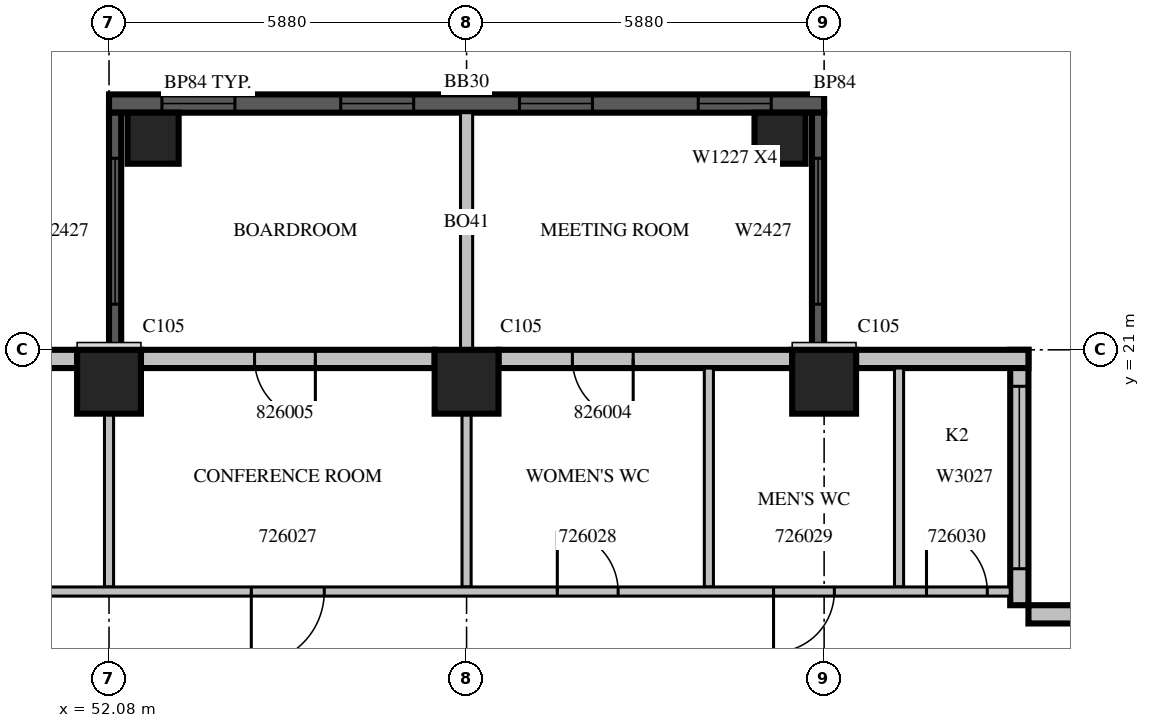
"""IFC4 building model, lengths in metres.
Left out: names, types, materials, properties, quantities, classifications, styles, units other than length and angle.
Written with IfcOpenShell. Run it as: python <this file> out.ifc"""

import sys

from ifc_helpers import new_model, si_unit, direction, frame, frame_2d, origin, origin_2d, place, context, subcontext, project, spatial, rectangle, extrude, source, transform, mapped, element, fill, save


model = new_model("IFC4")
c1 = context("Model", 3, precision=1e-05, world=origin(), true_north=direction((0.0, 1.0)))
c2 = subcontext(c1, "Body", "Model", "MODEL_VIEW")
j1 = project(units=[si_unit("LENGTHUNIT", "METRE"), si_unit("PLANEANGLEUNIT", "RADIAN")], contexts=[c1])
p1 = place(None, origin())
s1 = spatial("IfcSite", under=j1, at=p1, CompositionType="ELEMENT")
p2 = place(p1, origin())
s2 = spatial("IfcBuilding", under=s1, at=p2, CompositionType="ELEMENT")
p3 = place(p2, frame((0.0, 0.0, 120.3)))
s3 = spatial("IfcBuildingStorey", under=s2, at=p3, CompositionType="ELEMENT", Elevation=120.3)
m1 = source(origin(), c2, "Body", "SweptSolid", [
    extrude(rectangle(XDim=1.05, YDim=1.05, at=origin_2d()), origin(), (0.0, 0.0, 1.0), 4.2),
])
for number, where, z_axis, x_axis in (
    (1, (52.08, 20.475, 0.0), (0.0, 0.0, 1.0), (1.0, 0.0, 0.0)),
    (2, (57.96, 20.475, 0.0), (0.0, 0.0, 1.0), (1.0, 0.0, 0.0)),
    (3, (63.84, 20.475, 0.0), (0.0, 0.0, 1.0), (1.0, 0.0, 0.0)),
):
    element("IfcColumn", number, at=place(p3, frame(where, z_axis=z_axis, x_axis=x_axis)), inside=s3, PredefinedType="COLUMN", context=c2, shape_type="MappedRepresentation", body=[
        mapped(m1, transform((0.0, 0.0, 0.0), scale=1.0)),
    ])
m2 = source(origin(), c2, "Body", "SweptSolid", [
    extrude(rectangle(XDim=0.84, YDim=0.84, at=origin_2d()), origin(), (0.0, 0.0, 1.0), 4.2),
])
for number, where, z_axis, x_axis in (
    (4, (52.805, 24.48, 0.0), (0.0, 0.0, 1.0), (1.0, 0.0, 0.0)),
    (5, (63.115, 24.48, 0.0), (0.0, 0.0, 1.0), (1.0, 0.0, 0.0)),
):
    element("IfcColumn", number, at=place(p3, frame(where, z_axis=z_axis, x_axis=x_axis)), inside=s3, PredefinedType="COLUMN", context=c2, shape_type="MappedRepresentation", body=[
        mapped(m2, transform((0.0, 0.0, 0.0), scale=1.0)),
    ])
m3 = source(origin(), c2, "Body", "SweptSolid", [
    extrude(rectangle(XDim=11.76, YDim=0.3, at=frame_2d((5.88, 0.0))), origin(), (0.0, 0.0, 1.0), 3.79),
])
p4 = place(p3, frame((63.84, 25.05, 0.0), z_axis=(0.0, 0.0, 1.0), x_axis=(-1.0, 0.0, 0.0)))
e6 = element("IfcWall", 6, at=p4, inside=s3, PredefinedType="SOLIDWALL", context=c2, shape_type="MappedRepresentation", body=[
    mapped(m3, transform((0.0, 0.0, 0.0), scale=1.0)),
])
m4 = source(origin(), c2, "Body", "SweptSolid", [
    extrude(rectangle(XDim=1.2, YDim=2.7, at=frame_2d((0.6, 1.35))), frame((0.0, 0.16, 0.0), z_axis=(0.0, -1.0, 0.0), x_axis=(1.0, 0.0, 0.0)), (0.0, 0.0, 1.0), 0.32),
])
p5 = place(p4, frame((0.87, 0.0, 0.6)))
e7 = element("IfcOpeningElement", 7, at=p5, cuts=e6, PredefinedType="OPENING", context=c2, shape_type="MappedRepresentation", body=[
    mapped(m4, transform((0.0, 0.0, 0.0), scale=1.0)),
])
p6 = place(p4, frame((3.81, 0.0, 0.6)))
e8 = element("IfcOpeningElement", 8, at=p6, cuts=e6, PredefinedType="OPENING", context=c2, shape_type="MappedRepresentation", body=[
    mapped(m4, transform((0.0, 0.0, 0.0), scale=1.0)),
])
p7 = place(p4, frame((6.75, 0.0, 0.6)))
e9 = element("IfcOpeningElement", 9, at=p7, cuts=e6, PredefinedType="OPENING", context=c2, shape_type="MappedRepresentation", body=[
    mapped(m4, transform((0.0, 0.0, 0.0), scale=1.0)),
])
p8 = place(p4, frame((9.69, 0.0, 0.6)))
e10 = element("IfcOpeningElement", 10, at=p8, cuts=e6, PredefinedType="OPENING", context=c2, shape_type="MappedRepresentation", body=[
    mapped(m4, transform((0.0, 0.0, 0.0), scale=1.0)),
])
m5 = source(origin(), c2, "Body", "SweptSolid", [
    extrude(rectangle(XDim=3.9, YDim=0.2, at=frame_2d((1.95, 0.0))), origin(), (0.0, 0.0, 1.0), 3.79),
])
p9 = place(p3, frame((57.96, 21.0, 0.0), z_axis=(0.0, 0.0, 1.0), x_axis=(0.0, 1.0, 0.0)))
e11 = element("IfcWall", 11, at=p9, inside=s3, PredefinedType="SOLIDWALL", context=c2, shape_type="MappedRepresentation", body=[
    mapped(m5, transform((0.0, 0.0, 0.0), scale=1.0)),
])
m6 = source(origin(), c2, "Body", "SweptSolid", [
    extrude(rectangle(XDim=3.9, YDim=0.2, at=frame_2d((1.95, 0.0))), origin(), (0.0, 0.0, 1.0), 3.79),
])
p10 = place(p3, frame((63.74, 21.0, 0.0), z_axis=(0.0, 0.0, 1.0), x_axis=(0.0, 1.0, 0.0)))
e12 = element("IfcWall", 12, at=p10, inside=s3, PredefinedType="SOLIDWALL", context=c2, shape_type="MappedRepresentation", body=[
    mapped(m6, transform((0.0, 0.0, 0.0), scale=1.0)),
])
m7 = source(origin(), c2, "Body", "SweptSolid", [
    extrude(rectangle(XDim=2.4, YDim=2.7, at=frame_2d((1.2, 1.35))), frame((0.0, 0.11, 0.0), z_axis=(0.0, -1.0, 0.0), x_axis=(1.0, 0.0, 0.0)), (0.0, 0.0, 1.0), 0.22),
])
p11 = place(p10, frame((0.75, 0.0, 0.6)))
e13 = element("IfcOpeningElement", 13, at=p11, cuts=e12, PredefinedType="OPENING", context=c2, shape_type="MappedRepresentation", body=[
    mapped(m7, transform((0.0, 0.0, 0.0), scale=1.0)),
])
p12 = place(p3, frame((52.18, 21.0, 0.0), z_axis=(0.0, 0.0, 1.0), x_axis=(0.0, 1.0, 0.0)))
e14 = element("IfcWall", 14, at=p12, inside=s3, PredefinedType="SOLIDWALL", context=c2, shape_type="MappedRepresentation", body=[
    mapped(m6, transform((0.0, 0.0, 0.0), scale=1.0)),
])
p13 = place(p12, frame((0.75, 0.0, 0.6)))
e15 = element("IfcOpeningElement", 15, at=p13, cuts=e14, PredefinedType="OPENING", context=c2, shape_type="MappedRepresentation", body=[
    mapped(m7, transform((0.0, 0.0, 0.0), scale=1.0)),
])
m8 = source(origin(), c2, "Body", "SweptSolid", [
    extrude(rectangle(XDim=4.2, YDim=0.3, at=frame_2d((2.1, 0.0))), origin(), (0.0, 0.0, 1.0), 3.8),
])
p14 = place(p3, frame((71.4, 16.65, 0.0), z_axis=(0.0, 0.0, 1.0), x_axis=(-1.0, 0.0, 0.0)))
e16 = element("IfcWall", 16, at=p14, inside=s3, PredefinedType="STANDARD", context=c2, shape_type="MappedRepresentation", body=[
    mapped(m8, transform((0.0, 0.0, 0.0), scale=1.0)),
])
p15 = place(p14, frame((0.66, 0.0, 0.6)))
e17 = element("IfcOpeningElement", 17, at=p15, cuts=e16, PredefinedType="OPENING", context=c2, shape_type="MappedRepresentation", body=[
    mapped(m4, transform((0.0, 0.0, 0.0), scale=1.0)),
])
p16 = place(p3, frame((67.05, 16.8, 0.0), z_axis=(0.0, 0.0, 1.0), x_axis=(0.0, 1.0, 0.0)))
e18 = element("IfcWall", 18, at=p16, inside=s3, PredefinedType="STANDARD", context=c2, shape_type="MappedRepresentation", body=[
    mapped(m8, transform((0.0, 0.0, 0.0), scale=1.0)),
])
m9 = source(origin(), c2, "Body", "SweptSolid", [
    extrude(rectangle(XDim=3.0, YDim=2.7, at=frame_2d((1.5, 1.35))), frame((0.0, 0.16, 0.0), z_axis=(0.0, -1.0, 0.0), x_axis=(1.0, 0.0, 0.0)), (0.0, 0.0, 1.0), 0.32),
])
p17 = place(p16, frame((0.6, 0.0, 0.6)))
e19 = element("IfcOpeningElement", 19, at=p17, cuts=e18, PredefinedType="OPENING", context=c2, shape_type="MappedRepresentation", body=[
    mapped(m9, transform((0.0, 0.0, 0.0), scale=1.0)),
])
m10 = source(origin(), c2, "Body", "SweptSolid", [
    extrude(rectangle(XDim=2.835, YDim=0.3, at=frame_2d((1.417, 0.0))), origin(), (0.0, 0.0, 1.0), 3.8),
])
p18 = place(p3, frame((67.2, 20.85, 0.0), z_axis=(0.0, 0.0, 1.0), x_axis=(-1.0, 0.0, 0.0)))
e20 = element("IfcWall", 20, at=p18, inside=s3, PredefinedType="STANDARD", context=c2, shape_type="MappedRepresentation", body=[
    mapped(m10, transform((0.0, 0.0, 0.0), scale=1.0)),
])
m11 = source(origin(), c2, "Body", "SweptSolid", [
    extrude(rectangle(XDim=4.83, YDim=0.3, at=frame_2d((2.415, 0.0))), origin(), (0.0, 0.0, 1.0), 3.8),
])
p19 = place(p3, frame((63.315, 20.85, 0.0), z_axis=(0.0, 0.0, 1.0), x_axis=(-1.0, 0.0, 0.0)))
e21 = element("IfcWall", 21, at=p19, inside=s3, PredefinedType="STANDARD", context=c2, shape_type="MappedRepresentation", body=[
    mapped(m11, transform((0.0, 0.0, 0.0), scale=1.0)),
])
m12 = source(origin(), c2, "Body", "SweptSolid", [
    extrude(rectangle(XDim=1.0, YDim=2.1, at=frame_2d((0.5, 1.05))), frame((0.0, 0.16, 0.0), z_axis=(0.0, -1.0, 0.0), x_axis=(1.0, 0.0, 0.0)), (0.0, 0.0, 1.0), 0.32),
])
p20 = place(p19, frame((2.615, 0.0, 0.0)))
e22 = element("IfcOpeningElement", 22, at=p20, cuts=e21, PredefinedType="OPENING", context=c2, shape_type="MappedRepresentation", body=[
    mapped(m12, transform((0.0, 0.0, 0.0), scale=1.0)),
])
p21 = place(p3, frame((57.435, 20.85, 0.0), z_axis=(0.0, 0.0, 1.0), x_axis=(-1.0, 0.0, 0.0)))
e23 = element("IfcWall", 23, at=p21, inside=s3, PredefinedType="STANDARD", context=c2, shape_type="MappedRepresentation", body=[
    mapped(m11, transform((0.0, 0.0, 0.0), scale=1.0)),
])
p22 = place(p21, frame((1.962, 0.0, 0.0)))
e24 = element("IfcOpeningElement", 24, at=p22, cuts=e23, PredefinedType="OPENING", context=c2, shape_type="MappedRepresentation", body=[
    mapped(m12, transform((0.0, 0.0, 0.0), scale=1.0)),
])
m13 = source(origin(), c2, "Body", "SweptSolid", [
    extrude(rectangle(XDim=1.155, YDim=0.3, at=frame_2d((0.578, 0.0))), origin(), (0.0, 0.0, 1.0), 3.8),
])
p23 = place(p3, frame((51.555, 20.85, 0.0), z_axis=(0.0, 0.0, 1.0), x_axis=(-1.0, 0.0, 0.0)))
e25 = element("IfcWall", 25, at=p23, inside=s3, PredefinedType="STANDARD", context=c2, shape_type="MappedRepresentation", body=[
    mapped(m13, transform((0.0, 0.0, 0.0), scale=1.0)),
])
m14 = source(origin(), c2, "Body", "SweptSolid", [
    extrude(rectangle(XDim=2.851, YDim=0.15, at=frame_2d((1.425, 0.0))), origin(), (0.0, 0.0, 1.0), 3.8),
])
p24 = place(p3, frame((52.08, 19.951, 0.0), z_axis=(0.0, 0.0, 1.0), x_axis=(0.0, -1.0, 0.0)))
e26 = element("IfcWall", 26, at=p24, inside=s3, PredefinedType="PARTITIONING", context=c2, shape_type="MappedRepresentation", body=[
    mapped(m14, transform((0.0, 0.0, 0.0), scale=1.0)),
])
m15 = source(origin(), c2, "Body", "SweptSolid", [
    extrude(rectangle(XDim=3.6, YDim=0.15, at=frame_2d((1.8, 0.0))), origin(), (0.0, 0.0, 1.0), 3.8),
])
for number, where, z_axis, x_axis in (
    (27, (61.944, 20.7, 0.0), (0.0, 0.0, 1.0), (0.0, -1.0, 0.0)),
    (28, (65.072, 20.7, 0.0), (0.0, 0.0, 1.0), (0.0, -1.0, 0.0)),
):
    element("IfcWall", number, at=place(p3, frame(where, z_axis=z_axis, x_axis=x_axis)), inside=s3, PredefinedType="PARTITIONING", context=c2, shape_type="MappedRepresentation", body=[
        mapped(m15, transform((0.0, 0.0, 0.0), scale=1.0)),
    ])
p25 = place(p3, frame((57.96, 17.1, 0.0), z_axis=(0.0, 0.0, 1.0), x_axis=(0.0, 1.0, 0.0)))
e29 = element("IfcWall", 29, at=p25, inside=s3, PredefinedType="PARTITIONING", context=c2, shape_type="MappedRepresentation", body=[
    mapped(m14, transform((0.0, 0.0, 0.0), scale=1.0)),
])
m16 = source(origin(), c2, "Body", "SweptSolid", [
    extrude(rectangle(XDim=37.5, YDim=0.15, at=frame_2d((18.75, 0.0))), origin(), (0.0, 0.0, 1.0), 3.8),
])
p26 = place(p3, frame((29.4, 17.025, 0.0), z_axis=(0.0, 0.0, 1.0), x_axis=(1.0, 0.0, 0.0)))
e30 = element("IfcWall", 30, at=p26, inside=s3, PredefinedType="PARTITIONING", context=c2, shape_type="MappedRepresentation", body=[
    mapped(m16, transform((0.0, 0.0, 0.0), scale=1.0)),
])
m17 = source(origin(), c2, "Body", "SweptSolid", [
    extrude(rectangle(XDim=1.0, YDim=2.1, at=frame_2d((0.5, 1.05))), frame((0.0, 0.085, 0.0), z_axis=(0.0, -1.0, 0.0), x_axis=(1.0, 0.0, 0.0)), (0.0, 0.0, 1.0), 0.17),
])
p27 = place(p26, frame((1.357, 0.0, 0.0)))
e31 = element("IfcOpeningElement", 31, at=p27, cuts=e30, PredefinedType="OPENING", context=c2, shape_type="MappedRepresentation", body=[
    mapped(m17, transform((0.0, 0.0, 0.0), scale=1.0)),
])
p28 = place(p26, frame((4.669, 0.0, 0.0)))
e32 = element("IfcOpeningElement", 32, at=p28, cuts=e30, PredefinedType="OPENING", context=c2, shape_type="MappedRepresentation", body=[
    mapped(m17, transform((0.0, 0.0, 0.0), scale=1.0)),
])
p29 = place(p26, frame((7.012, 0.0, 0.0)))
e33 = element("IfcOpeningElement", 33, at=p29, cuts=e30, PredefinedType="OPENING", context=c2, shape_type="MappedRepresentation", body=[
    mapped(m17, transform((0.0, 0.0, 0.0), scale=1.0)),
])
m18 = source(origin(), c2, "Body", "SweptSolid", [
    extrude(rectangle(XDim=0.9, YDim=2.1, at=frame_2d((0.45, 1.05))), frame((0.0, 0.085, 0.0), z_axis=(0.0, -1.0, 0.0), x_axis=(1.0, 0.0, 0.0)), (0.0, 0.0, 1.0), 0.17),
])
p30 = place(p26, frame((10.05, 0.0, 0.0)))
e34 = element("IfcOpeningElement", 34, at=p30, cuts=e30, PredefinedType="OPENING", context=c2, shape_type="MappedRepresentation", body=[
    mapped(m18, transform((0.0, 0.0, 0.0), scale=1.0)),
])
p31 = place(p26, frame((13.474, 0.0, 0.0)))
e35 = element("IfcOpeningElement", 35, at=p31, cuts=e30, PredefinedType="OPENING", context=c2, shape_type="MappedRepresentation", body=[
    mapped(m17, transform((0.0, 0.0, 0.0), scale=1.0)),
])
p32 = place(p26, frame((15.624, 0.0, 0.0)))
e36 = element("IfcOpeningElement", 36, at=p32, cuts=e30, PredefinedType="OPENING", context=c2, shape_type="MappedRepresentation", body=[
    mapped(m18, transform((0.0, 0.0, 0.0), scale=1.0)),
])
m19 = source(origin(), c2, "Body", "SweptSolid", [
    extrude(rectangle(XDim=1.2, YDim=2.1, at=frame_2d((0.6, 1.05))), frame((0.0, 0.085, 0.0), z_axis=(0.0, -1.0, 0.0), x_axis=(1.0, 0.0, 0.0)), (0.0, 0.0, 1.0), 0.17),
])
p33 = place(p26, frame((19.14, 0.0, 0.0)))
e37 = element("IfcOpeningElement", 37, at=p33, cuts=e30, PredefinedType="OPENING", context=c2, shape_type="MappedRepresentation", body=[
    mapped(m19, transform((0.0, 0.0, 0.0), scale=1.0)),
])
p34 = place(p26, frame((25.02, 0.0, 0.0)))
e38 = element("IfcOpeningElement", 38, at=p34, cuts=e30, PredefinedType="OPENING", context=c2, shape_type="MappedRepresentation", body=[
    mapped(m19, transform((0.0, 0.0, 0.0), scale=1.0)),
])
p35 = place(p26, frame((30.052, 0.0, 0.0)))
e39 = element("IfcOpeningElement", 39, at=p35, cuts=e30, PredefinedType="OPENING", context=c2, shape_type="MappedRepresentation", body=[
    mapped(m17, transform((0.0, 0.0, 0.0), scale=1.0)),
])
p36 = place(p26, frame((33.608, 0.0, 0.0)))
e40 = element("IfcOpeningElement", 40, at=p36, cuts=e30, PredefinedType="OPENING", context=c2, shape_type="MappedRepresentation", body=[
    mapped(m17, transform((0.0, 0.0, 0.0), scale=1.0)),
])
p37 = place(p26, frame((36.124, 0.0, 0.0)))
e41 = element("IfcOpeningElement", 41, at=p37, cuts=e30, PredefinedType="OPENING", context=c2, shape_type="MappedRepresentation", body=[
    mapped(m17, transform((0.0, 0.0, 0.0), scale=1.0)),
])
m20 = source(origin(), c2, "Body", "SweptSolid", [
    extrude(rectangle(XDim=1.2, YDim=2.7, at=frame_2d((0.6, 1.35))), frame((0.0, 0.03, 0.0), z_axis=(0.0, -1.0, 0.0), x_axis=(1.0, 0.0, 0.0)), (0.0, 0.0, 1.0), 0.06),
])
p38 = place(p5, origin())
e42 = element("IfcWindow", 42, at=p38, inside=s3, PartitioningType="SINGLE_PANEL", PredefinedType="WINDOW", context=c2, shape_type="MappedRepresentation", body=[
    mapped(m20, transform((0.0, 0.0, 0.0), scale=1.0)),
])
fill(e7, e42)
p39 = place(p6, origin())
e43 = element("IfcWindow", 43, at=p39, inside=s3, PartitioningType="SINGLE_PANEL", PredefinedType="WINDOW", context=c2, shape_type="MappedRepresentation", body=[
    mapped(m20, transform((0.0, 0.0, 0.0), scale=1.0)),
])
fill(e8, e43)
p40 = place(p7, origin())
e44 = element("IfcWindow", 44, at=p40, inside=s3, PartitioningType="SINGLE_PANEL", PredefinedType="WINDOW", context=c2, shape_type="MappedRepresentation", body=[
    mapped(m20, transform((0.0, 0.0, 0.0), scale=1.0)),
])
fill(e9, e44)
p41 = place(p8, origin())
e45 = element("IfcWindow", 45, at=p41, inside=s3, PartitioningType="SINGLE_PANEL", PredefinedType="WINDOW", context=c2, shape_type="MappedRepresentation", body=[
    mapped(m20, transform((0.0, 0.0, 0.0), scale=1.0)),
])
fill(e10, e45)
m21 = source(origin(), c2, "Body", "SweptSolid", [
    extrude(rectangle(XDim=2.4, YDim=2.7, at=frame_2d((1.2, 1.35))), frame((0.0, 0.03, 0.0), z_axis=(0.0, -1.0, 0.0), x_axis=(1.0, 0.0, 0.0)), (0.0, 0.0, 1.0), 0.06),
])
p42 = place(p11, origin())
e46 = element("IfcWindow", 46, at=p42, inside=s3, PartitioningType="SINGLE_PANEL", PredefinedType="WINDOW", context=c2, shape_type="MappedRepresentation", body=[
    mapped(m21, transform((0.0, 0.0, 0.0), scale=1.0)),
])
fill(e13, e46)
p43 = place(p13, origin())
e47 = element("IfcWindow", 47, at=p43, inside=s3, PartitioningType="SINGLE_PANEL", PredefinedType="WINDOW", context=c2, shape_type="MappedRepresentation", body=[
    mapped(m21, transform((0.0, 0.0, 0.0), scale=1.0)),
])
fill(e15, e47)
m22 = source(origin(), c2, "Body", "SweptSolid", [
    extrude(rectangle(XDim=3.0, YDim=2.7, at=frame_2d((1.5, 1.35))), frame((0.0, 0.03, 0.0), z_axis=(0.0, -1.0, 0.0), x_axis=(1.0, 0.0, 0.0)), (0.0, 0.0, 1.0), 0.06),
])
p44 = place(p17, origin())
e48 = element("IfcWindow", 48, at=p44, inside=s3, PartitioningType="SINGLE_PANEL", PredefinedType="WINDOW", context=c2, shape_type="MappedRepresentation", body=[
    mapped(m22, transform((0.0, 0.0, 0.0), scale=1.0)),
])
fill(e19, e48)
m23 = source(origin(), c2, "Body", "SweptSolid", [
    extrude(rectangle(XDim=1.2, YDim=2.1, at=frame_2d((0.6, 1.05))), frame((0.0, 0.025, 0.0), z_axis=(0.0, -1.0, 0.0), x_axis=(1.0, 0.0, 0.0)), (0.0, 0.0, 1.0), 0.05),
])
p45 = place(p34, origin())
e49 = element("IfcDoor", 49, at=p45, inside=s3, OperationType="SINGLE_SWING_RIGHT", PredefinedType="DOOR", context=c2, shape_type="MappedRepresentation", body=[
    mapped(m23, transform((0.0, 0.0, 0.0), scale=1.0)),
])
fill(e38, e49)
m24 = source(origin(), c2, "Body", "SweptSolid", [
    extrude(rectangle(XDim=1.0, YDim=2.1, at=frame_2d((0.5, 1.05))), frame((0.0, 0.025, 0.0), z_axis=(0.0, -1.0, 0.0), x_axis=(1.0, 0.0, 0.0)), (0.0, 0.0, 1.0), 0.05),
])
p46 = place(p35, origin())
e50 = element("IfcDoor", 50, at=p46, inside=s3, OperationType="SINGLE_SWING_LEFT", PredefinedType="DOOR", context=c2, shape_type="MappedRepresentation", body=[
    mapped(m24, transform((0.0, 0.0, 0.0), scale=1.0)),
])
fill(e39, e50)
p47 = place(p36, origin())
e51 = element("IfcDoor", 51, at=p47, inside=s3, OperationType="SINGLE_SWING_RIGHT", PredefinedType="DOOR", context=c2, shape_type="MappedRepresentation", body=[
    mapped(m24, transform((0.0, 0.0, 0.0), scale=1.0)),
])
fill(e40, e51)
p48 = place(p37, origin())
e52 = element("IfcDoor", 52, at=p48, inside=s3, OperationType="SINGLE_SWING_LEFT", PredefinedType="DOOR", context=c2, shape_type="MappedRepresentation", body=[
    mapped(m24, transform((0.0, 0.0, 0.0), scale=1.0)),
])
fill(e41, e52)
p49 = place(p20, origin())
e53 = element("IfcDoor", 53, at=p49, inside=s3, OperationType="SINGLE_SWING_LEFT", PredefinedType="DOOR", context=c2, shape_type="MappedRepresentation", body=[
    mapped(m24, transform((0.0, 0.0, 0.0), scale=1.0)),
])
fill(e22, e53)
p50 = place(p22, origin())
e54 = element("IfcDoor", 54, at=p50, inside=s3, OperationType="SINGLE_SWING_LEFT", PredefinedType="DOOR", context=c2, shape_type="MappedRepresentation", body=[
    mapped(m24, transform((0.0, 0.0, 0.0), scale=1.0)),
])
fill(e24, e54)
save(model, sys.argv[1])
